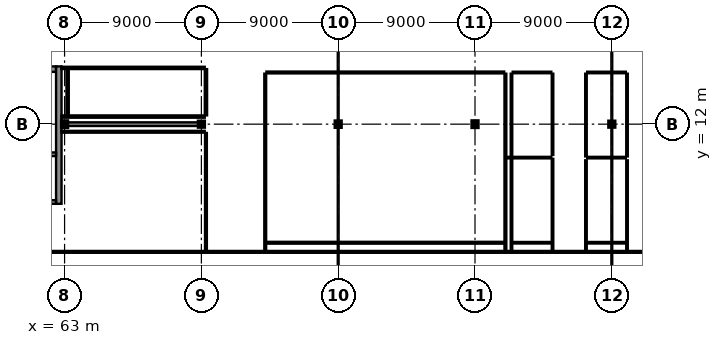
"""IFC4 building model, lengths in metres.
Left out: names, types, materials, properties, quantities, classifications, styles, units other than length and angle.
Written with IfcOpenShell. Run it as: python <this file> out.ifc"""

import sys

from ifc_helpers import new_model, si_unit, direction, frame, frame_2d, origin, origin_2d, place, context, subcontext, project, spatial, rectangle, i_section, extrude, element, fill, save


model = new_model("IFC4")
c1 = context("Model", 3, precision=1e-05, world=origin(), true_north=direction((0.0, 1.0)))
c2 = subcontext(c1, "Body", "Model", "MODEL_VIEW")
j1 = project(units=[si_unit("LENGTHUNIT", "METRE"), si_unit("PLANEANGLEUNIT", "RADIAN")], contexts=[c1])
p1 = place(None, origin())
s1 = spatial("IfcSite", under=j1, at=p1, CompositionType="ELEMENT")
p2 = place(p1, origin())
s2 = spatial("IfcBuilding", under=s1, at=p2, CompositionType="ELEMENT")
p3 = place(p2, frame((0.0, 0.0, 23.4)))
s3 = spatial("IfcBuildingStorey", under=s2, at=p3, CompositionType="ELEMENT", Elevation=23.4)
p4 = place(p3, frame((63.0, 12.0, 0.0), z_axis=(0.0, 0.0, 1.0), x_axis=(1.0, 0.0, 0.0)))
e1 = element("IfcColumn", 1, at=p4, inside=s3, PredefinedType="COLUMN", context=c2, shape_type="SweptSolid", body=[
    extrude(i_section(OverallWidth=0.3, OverallDepth=0.34, WebThickness=0.012, FlangeThickness=0.021, at=origin_2d()), origin(), (0.0, 0.0, 1.0), 4.0),
])
p5 = place(p3, frame((72.0, 12.0, 0.0), z_axis=(0.0, 0.0, 1.0), x_axis=(0.0, 1.0, 0.0)))
e2 = element("IfcColumn", 2, at=p5, inside=s3, PredefinedType="COLUMN", context=c2, shape_type="SweptSolid", body=[
    extrude(i_section(OverallWidth=0.3, OverallDepth=0.3, WebThickness=0.011, FlangeThickness=0.019, at=origin_2d()), origin(), (0.0, 0.0, 1.0), 4.0),
])
p6 = place(p3, frame((81.0, 12.0, 0.0), z_axis=(0.0, 0.0, 1.0), x_axis=(1.0, 0.0, 0.0)))
e3 = element("IfcColumn", 3, at=p6, inside=s3, PredefinedType="COLUMN", context=c2, shape_type="SweptSolid", body=[
    extrude(i_section(OverallWidth=0.3, OverallDepth=0.32, WebThickness=0.011, FlangeThickness=0.021, at=origin_2d()), origin(), (0.0, 0.0, 1.0), 4.0),
])
p7 = place(p3, frame((90.0, 12.0, 0.0), z_axis=(0.0, 0.0, 1.0), x_axis=(1.0, 0.0, 0.0)))
e4 = element("IfcColumn", 4, at=p7, inside=s3, PredefinedType="COLUMN", context=c2, shape_type="SweptSolid", body=[
    extrude(i_section(OverallWidth=0.3, OverallDepth=0.34, WebThickness=0.012, FlangeThickness=0.021, at=origin_2d()), origin(), (0.0, 0.0, 1.0), 4.0),
])
p8 = place(p3, frame((99.0, 12.0, 0.0), z_axis=(0.0, 0.0, 1.0), x_axis=(1.0, 0.0, 0.0)))
e5 = element("IfcColumn", 5, at=p8, inside=s3, PredefinedType="COLUMN", context=c2, shape_type="SweptSolid", body=[
    extrude(i_section(OverallWidth=0.3, OverallDepth=0.3, WebThickness=0.011, FlangeThickness=0.019, at=origin_2d()), origin(), (0.0, 0.0, 1.0), 4.0),
])
p9 = place(p3, frame((58.54, 15.62, 0.0), z_axis=(0.0, 0.0, 1.0), x_axis=(1.0, 0.0, 0.0)))
e6 = element("IfcWall", 6, at=p9, inside=s3, PredefinedType="SHEAR", context=c2, shape_type="SweptSolid", body=[
    extrude(rectangle(XDim=3.9, YDim=0.36, at=frame_2d((1.95, 0.0))), origin(), (0.0, 0.0, 1.0), 3.66),
])
p10 = place(p9, frame((1.15, 0.0, 0.0)))
e7 = element("IfcOpeningElement", 7, at=p10, cuts=e6, PredefinedType="OPENING", context=c2, shape_type="SweptSolid", body=[
    extrude(rectangle(XDim=1.6, YDim=2.25, at=frame_2d((0.8, 1.125))), frame((0.0, 0.195, 0.0), z_axis=(0.0, -1.0, 0.0), x_axis=(1.0, 0.0, 0.0)), (0.0, 0.0, 1.0), 0.39),
])
p11 = place(p3, frame((62.62, 6.76, 0.0), z_axis=(0.0, 0.0, 1.0), x_axis=(0.0, 1.0, 0.0)))
e8 = element("IfcWall", 8, at=p11, inside=s3, PredefinedType="SHEAR", context=c2, shape_type="SweptSolid", body=[
    extrude(rectangle(XDim=9.04, YDim=0.36, at=frame_2d((4.52, 0.0))), origin(), (0.0, 0.0, 1.0), 3.66),
])
p12 = place(p3, frame((58.54, 10.02, 0.0), z_axis=(0.0, 0.0, 1.0), x_axis=(1.0, 0.0, 0.0)))
e9 = element("IfcWall", 9, at=p12, inside=s3, PredefinedType="SHEAR", context=c2, shape_type="SweptSolid", body=[
    extrude(rectangle(XDim=3.9, YDim=0.24, at=frame_2d((1.95, 0.0))), origin(), (0.0, 0.0, 1.0), 3.81),
])
p13 = place(p12, frame((0.235, 0.0, 0.0)))
e10 = element("IfcOpeningElement", 10, at=p13, cuts=e9, PredefinedType="OPENING", context=c2, shape_type="SweptSolid", body=[
    extrude(rectangle(XDim=1.6, YDim=2.3, at=frame_2d((0.8, 1.15))), frame((0.0, 0.135, 0.0), z_axis=(0.0, -1.0, 0.0), x_axis=(1.0, 0.0, 0.0)), (0.0, 0.0, 1.0), 0.27),
])
p14 = place(p12, frame((2.185, 0.0, 0.0)))
e11 = element("IfcOpeningElement", 11, at=p14, cuts=e9, PredefinedType="OPENING", context=c2, shape_type="SweptSolid", body=[
    extrude(rectangle(XDim=1.6, YDim=2.3, at=frame_2d((0.8, 1.15))), frame((0.0, 0.135, 0.0), z_axis=(0.0, -1.0, 0.0), x_axis=(1.0, 0.0, 0.0)), (0.0, 0.0, 1.0), 0.27),
])
p15 = place(p3, frame((58.54, 6.88, 0.0), z_axis=(0.0, 0.0, 1.0), x_axis=(1.0, 0.0, 0.0)))
e12 = element("IfcWall", 12, at=p15, inside=s3, PredefinedType="SHEAR", context=c2, shape_type="SweptSolid", body=[
    extrude(rectangle(XDim=3.9, YDim=0.24, at=frame_2d((1.95, 0.0))), origin(), (0.0, 0.0, 1.0), 3.81),
])
p16 = place(p3, frame((63.008, 12.0, 0.0), z_axis=(0.0, 0.0, 1.0), x_axis=(1.0, 0.0, 0.0)))
e13 = element("IfcWall", 13, at=p16, inside=s3, PredefinedType="SHEAR", context=c2, shape_type="SweptSolid", body=[
    extrude(rectangle(XDim=8.844, YDim=0.24, at=frame_2d((4.422, 0.0))), origin(), (0.0, 0.0, 1.0), 2.845),
])
p17 = place(p3, frame((53.87, 3.6, 0.0), z_axis=(0.0, 0.0, 1.0), x_axis=(1.0, 0.0, 0.0)))
e14 = element("IfcWall", 14, at=p17, inside=s3, PredefinedType="PARTITIONING", context=c2, shape_type="SweptSolid", body=[
    extrude(rectangle(XDim=63.25, YDim=0.12, at=frame_2d((31.625, 0.0))), origin(), (0.0, 0.0, 1.0), 3.64),
])
p18 = place(p17, frame((19.855, 0.0, 0.0)))
e15 = element("IfcOpeningElement", 15, at=p18, cuts=e14, PredefinedType="OPENING", context=c2, shape_type="SweptSolid", body=[
    extrude(rectangle(XDim=0.95, YDim=2.15, at=frame_2d((0.475, 1.075))), frame((0.0, 0.075, 0.0), z_axis=(0.0, -1.0, 0.0), x_axis=(1.0, 0.0, 0.0)), (0.0, 0.0, 1.0), 0.15),
])
p19 = place(p3, frame((72.3, 11.42, 0.0), z_axis=(0.0, 0.0, 1.0), x_axis=(0.0, -1.0, 0.0)))
e16 = element("IfcWall", 16, at=p19, inside=s3, PredefinedType="PARTITIONING", context=c2, shape_type="SweptSolid", body=[
    extrude(rectangle(XDim=7.765, YDim=0.12, at=frame_2d((3.882, 0.0))), origin(), (0.0, 0.0, 1.0), 3.64),
])
p20 = place(p19, frame((3.433, 0.0, 0.0)))
e17 = element("IfcOpeningElement", 17, at=p20, cuts=e16, PredefinedType="OPENING", context=c2, shape_type="SweptSolid", body=[
    extrude(rectangle(XDim=0.9, YDim=2.1, at=frame_2d((0.45, 1.05))), frame((0.0, 0.075, 0.0), z_axis=(0.0, -1.0, 0.0), x_axis=(1.0, 0.0, 0.0)), (0.0, 0.0, 1.0), 0.15),
])
p21 = place(p3, frame((62.795, 11.5, 0.0), z_axis=(0.0, 0.0, 1.0), x_axis=(1.0, 0.0, 0.0)))
e18 = element("IfcWall", 18, at=p21, inside=s3, PredefinedType="PARTITIONING", context=c2, shape_type="SweptSolid", body=[
    extrude(rectangle(XDim=9.425, YDim=0.12, at=frame_2d((4.712, 0.0))), origin(), (0.0, 0.0, 1.0), 3.64),
])
p22 = place(p3, frame((72.22, 12.5, 0.0), z_axis=(0.0, 0.0, 1.0), x_axis=(-1.0, 0.0, 0.0)))
e19 = element("IfcWall", 19, at=p22, inside=s3, PredefinedType="PARTITIONING", context=c2, shape_type="SweptSolid", body=[
    extrude(rectangle(XDim=9.425, YDim=0.15, at=frame_2d((4.712, 0.0))), origin(), (0.0, 0.0, 1.0), 3.64),
])
p23 = place(p3, frame((63.2, 12.57, 0.0), z_axis=(0.0, 0.0, 1.0), x_axis=(0.0, 1.0, 0.0)))
e20 = element("IfcWall", 20, at=p23, inside=s3, PredefinedType="PARTITIONING", context=c2, shape_type="SweptSolid", body=[
    extrude(rectangle(XDim=3.05, YDim=0.15, at=frame_2d((1.525, 0.0))), origin(), (0.0, 0.0, 1.0), 3.365),
])
p24 = place(p3, frame((62.795, 15.7, 0.0), z_axis=(0.0, 0.0, 1.0), x_axis=(1.0, 0.0, 0.0)))
e21 = element("IfcWall", 21, at=p24, inside=s3, PredefinedType="PARTITIONING", context=c2, shape_type="SweptSolid", body=[
    extrude(rectangle(XDim=9.425, YDim=0.15, at=frame_2d((4.712, 0.0))), origin(), (0.0, 0.0, 1.0), 3.64),
])
p25 = place(p24, frame((4.187, 0.0, 0.0)))
e22 = element("IfcOpeningElement", 22, at=p25, cuts=e21, PredefinedType="OPENING", context=c2, shape_type="SweptSolid", body=[
    extrude(rectangle(XDim=1.05, YDim=2.25, at=frame_2d((0.525, 1.125))), frame((0.0, 0.09, 0.0), z_axis=(0.0, -1.0, 0.0), x_axis=(1.0, 0.0, 0.0)), (0.0, 0.0, 1.0), 0.18),
])
p26 = place(p3, frame((72.3, 15.62, 0.0), z_axis=(0.0, 0.0, 1.0), x_axis=(0.0, -1.0, 0.0)))
e23 = element("IfcWall", 23, at=p26, inside=s3, PredefinedType="PARTITIONING", context=c2, shape_type="SweptSolid", body=[
    extrude(rectangle(XDim=3.04, YDim=0.15, at=frame_2d((1.52, 0.0))), origin(), (0.0, 0.0, 1.0), 3.64),
])
p27 = place(p3, frame((92.0, 15.32, 0.0), z_axis=(0.0, 0.0, 1.0), x_axis=(0.0, -1.0, 0.0)))
e24 = element("IfcWall", 24, at=p27, inside=s3, PredefinedType="PARTITIONING", context=c2, shape_type="SweptSolid", body=[
    extrude(rectangle(XDim=11.665, YDim=0.12, at=frame_2d((5.833, 0.0))), origin(), (0.0, 0.0, 1.0), 3.64),
])
p28 = place(p3, frame((91.945, 4.2, 0.0), z_axis=(0.0, 0.0, 1.0), x_axis=(-1.0, 0.0, 0.0)))
e25 = element("IfcWall", 25, at=p28, inside=s3, PredefinedType="PARTITIONING", context=c2, shape_type="SweptSolid", body=[
    extrude(rectangle(XDim=15.665, YDim=0.12, at=frame_2d((7.833, 0.0))), origin(), (0.0, 0.0, 1.0), 3.64),
])
p29 = place(p3, frame((76.2, 3.655, 0.0), z_axis=(0.0, 0.0, 1.0), x_axis=(0.0, 1.0, 0.0)))
e26 = element("IfcWall", 26, at=p29, inside=s3, PredefinedType="PARTITIONING", context=c2, shape_type="SweptSolid", body=[
    extrude(rectangle(XDim=11.665, YDim=0.12, at=frame_2d((5.833, 0.0))), origin(), (0.0, 0.0, 1.0), 3.64),
])
p30 = place(p3, frame((76.28, 15.4, 0.0), z_axis=(0.0, 0.0, 1.0), x_axis=(1.0, 0.0, 0.0)))
e27 = element("IfcWall", 27, at=p30, inside=s3, PredefinedType="PARTITIONING", context=c2, shape_type="SweptSolid", body=[
    extrude(rectangle(XDim=15.64, YDim=0.12, at=frame_2d((7.82, 0.0))), origin(), (0.0, 0.0, 1.0), 3.64),
])
p31 = place(p30, frame((7.37, 0.0, 0.0)))
e28 = element("IfcOpeningElement", 28, at=p31, cuts=e27, PredefinedType="OPENING", context=c2, shape_type="SweptSolid", body=[
    extrude(rectangle(XDim=0.9, YDim=2.1, at=frame_2d((0.45, 1.05))), frame((0.0, 0.075, 0.0), z_axis=(0.0, -1.0, 0.0), x_axis=(1.0, 0.0, 0.0)), (0.0, 0.0, 1.0), 0.15),
])
p32 = place(p3, frame((92.4, 3.655, 0.0), z_axis=(0.0, 0.0, 1.0), x_axis=(0.0, 1.0, 0.0)))
e29 = element("IfcWall", 29, at=p32, inside=s3, PredefinedType="PARTITIONING", context=c2, shape_type="SweptSolid", body=[
    extrude(rectangle(XDim=6.065, YDim=0.1, at=frame_2d((3.032, 0.0))), origin(), (0.0, 0.0, 1.0), 3.64),
])
p33 = place(p3, frame((92.055, 9.8, 0.0), z_axis=(0.0, 0.0, 1.0), x_axis=(1.0, 0.0, 0.0)))
e30 = element("IfcWall", 30, at=p33, inside=s3, PredefinedType="PARTITIONING", context=c2, shape_type="SweptSolid", body=[
    extrude(rectangle(XDim=2.965, YDim=0.1, at=frame_2d((1.482, 0.0))), origin(), (0.0, 0.0, 1.0), 3.64),
])
p34 = place(p3, frame((95.1, 9.72, 0.0), z_axis=(0.0, 0.0, 1.0), x_axis=(0.0, -1.0, 0.0)))
e31 = element("IfcWall", 31, at=p34, inside=s3, PredefinedType="PARTITIONING", context=c2, shape_type="SweptSolid", body=[
    extrude(rectangle(XDim=6.065, YDim=0.1, at=frame_2d((3.032, 0.0))), origin(), (0.0, 0.0, 1.0), 3.64),
])
p35 = place(p34, frame((2.529, 0.0, 0.0)))
e32 = element("IfcOpeningElement", 32, at=p35, cuts=e31, PredefinedType="OPENING", context=c2, shape_type="SweptSolid", body=[
    extrude(rectangle(XDim=0.9, YDim=2.05, at=frame_2d((0.45, 1.025))), frame((0.0, 0.065, 0.0), z_axis=(0.0, -1.0, 0.0), x_axis=(1.0, 0.0, 0.0)), (0.0, 0.0, 1.0), 0.13),
])
p36 = place(p3, frame((95.055, 4.2, 0.0), z_axis=(0.0, 0.0, 1.0), x_axis=(-1.0, 0.0, 0.0)))
e33 = element("IfcWall", 33, at=p36, inside=s3, PredefinedType="PARTITIONING", context=c2, shape_type="SweptSolid", body=[
    extrude(rectangle(XDim=2.61, YDim=0.1, at=frame_2d((1.305, 0.0))), origin(), (0.0, 0.0, 1.0), 3.64),
])
p37 = place(p3, frame((92.48, 15.4, 0.0), z_axis=(0.0, 0.0, 1.0), x_axis=(1.0, 0.0, 0.0)))
e34 = element("IfcWall", 34, at=p37, inside=s3, PredefinedType="PARTITIONING", context=c2, shape_type="SweptSolid", body=[
    extrude(rectangle(XDim=2.54, YDim=0.1, at=frame_2d((1.27, 0.0))), origin(), (0.0, 0.0, 1.0), 3.64),
])
p38 = place(p3, frame((95.1, 15.32, 0.0), z_axis=(0.0, 0.0, 1.0), x_axis=(0.0, -1.0, 0.0)))
e35 = element("IfcWall", 35, at=p38, inside=s3, PredefinedType="PARTITIONING", context=c2, shape_type="SweptSolid", body=[
    extrude(rectangle(XDim=5.34, YDim=0.1, at=frame_2d((2.67, 0.0))), origin(), (0.0, 0.0, 1.0), 3.64),
])
p39 = place(p38, frame((2.22, 0.0, 0.0)))
e36 = element("IfcOpeningElement", 36, at=p39, cuts=e35, PredefinedType="OPENING", context=c2, shape_type="SweptSolid", body=[
    extrude(rectangle(XDim=0.9, YDim=2.05, at=frame_2d((0.45, 1.025))), frame((0.0, 0.065, 0.0), z_axis=(0.0, -1.0, 0.0), x_axis=(1.0, 0.0, 0.0)), (0.0, 0.0, 1.0), 0.13),
])
p40 = place(p3, frame((92.4, 9.845, 0.0), z_axis=(0.0, 0.0, 1.0), x_axis=(0.0, 1.0, 0.0)))
e37 = element("IfcWall", 37, at=p40, inside=s3, PredefinedType="PARTITIONING", context=c2, shape_type="SweptSolid", body=[
    extrude(rectangle(XDim=5.475, YDim=0.1, at=frame_2d((2.738, 0.0))), origin(), (0.0, 0.0, 1.0), 3.64),
])
p41 = place(p3, frame((100.0, 15.32, 0.0), z_axis=(0.0, 0.0, 1.0), x_axis=(0.0, -1.0, 0.0)))
e38 = element("IfcWall", 38, at=p41, inside=s3, PredefinedType="PARTITIONING", context=c2, shape_type="SweptSolid", body=[
    extrude(rectangle(XDim=5.44, YDim=0.1, at=frame_2d((2.72, 0.0))), origin(), (0.0, 0.0, 1.0), 3.64),
])
p42 = place(p3, frame((99.92, 9.8, 0.0), z_axis=(0.0, 0.0, 1.0), x_axis=(-1.0, 0.0, 0.0)))
e39 = element("IfcWall", 39, at=p42, inside=s3, PredefinedType="PARTITIONING", context=c2, shape_type="SweptSolid", body=[
    extrude(rectangle(XDim=2.54, YDim=0.1, at=frame_2d((1.27, 0.0))), origin(), (0.0, 0.0, 1.0), 3.64),
])
p43 = place(p3, frame((97.3, 9.88, 0.0), z_axis=(0.0, 0.0, 1.0), x_axis=(0.0, 1.0, 0.0)))
e40 = element("IfcWall", 40, at=p43, inside=s3, PredefinedType="PARTITIONING", context=c2, shape_type="SweptSolid", body=[
    extrude(rectangle(XDim=5.44, YDim=0.1, at=frame_2d((2.72, 0.0))), origin(), (0.0, 0.0, 1.0), 3.64),
])
p44 = place(p43, frame((2.22, 0.0, 0.0)))
e41 = element("IfcOpeningElement", 41, at=p44, cuts=e40, PredefinedType="OPENING", context=c2, shape_type="SweptSolid", body=[
    extrude(rectangle(XDim=1.0, YDim=2.1, at=frame_2d((0.5, 1.05))), frame((0.0, 0.065, 0.0), z_axis=(0.0, -1.0, 0.0), x_axis=(1.0, 0.0, 0.0)), (0.0, 0.0, 1.0), 0.13),
])
for number, where, z_axis, x_axis in (
    (42, (97.38, 15.4, 0.0), (0.0, 0.0, 1.0), (1.0, 0.0, 0.0)),
    (43, (99.92, 4.2, 0.0), (0.0, 0.0, 1.0), (-1.0, 0.0, 0.0)),
):
    element("IfcWall", number, at=place(p3, frame(where, z_axis=z_axis, x_axis=x_axis)), inside=s3, PredefinedType="PARTITIONING", context=c2, shape_type="SweptSolid", body=[
        extrude(rectangle(XDim=2.54, YDim=0.1, at=frame_2d((1.27, 0.0))), origin(), (0.0, 0.0, 1.0), 3.64),
    ])
p45 = place(p3, frame((97.3, 3.655, 0.0), z_axis=(0.0, 0.0, 1.0), x_axis=(0.0, 1.0, 0.0)))
e44 = element("IfcWall", 44, at=p45, inside=s3, PredefinedType="PARTITIONING", context=c2, shape_type="SweptSolid", body=[
    extrude(rectangle(XDim=5.965, YDim=0.1, at=frame_2d((2.982, 0.0))), origin(), (0.0, 0.0, 1.0), 3.64),
])
p46 = place(p45, frame((2.586, 0.0, 0.0)))
e45 = element("IfcOpeningElement", 45, at=p46, cuts=e44, PredefinedType="OPENING", context=c2, shape_type="SweptSolid", body=[
    extrude(rectangle(XDim=0.9, YDim=2.05, at=frame_2d((0.45, 1.025))), frame((0.0, 0.065, 0.0), z_axis=(0.0, -1.0, 0.0), x_axis=(1.0, 0.0, 0.0)), (0.0, 0.0, 1.0), 0.13),
])
p47 = place(p3, frame((100.0, 9.62, 0.0), z_axis=(0.0, 0.0, 1.0), x_axis=(0.0, -1.0, 0.0)))
e46 = element("IfcWall", 46, at=p47, inside=s3, PredefinedType="PARTITIONING", context=c2, shape_type="SweptSolid", body=[
    extrude(rectangle(XDim=5.965, YDim=0.1, at=frame_2d((2.982, 0.0))), origin(), (0.0, 0.0, 1.0), 3.64),
])
p48 = place(p14, origin())
e47 = element("IfcDoor", 47, at=p48, inside=s3, OperationType="DOUBLE_DOOR_SLIDING", PredefinedType="DOOR", context=c2, shape_type="SweptSolid", body=[
    extrude(rectangle(XDim=1.6, YDim=2.3, at=frame_2d((0.8, 1.15))), frame((0.0, 0.025, 0.0), z_axis=(0.0, -1.0, 0.0), x_axis=(1.0, 0.0, 0.0)), (0.0, 0.0, 1.0), 0.05),
])
fill(e11, e47)
p49 = place(p18, frame((0.95, 0.0, 0.0), z_axis=(0.0, 0.0, 1.0), x_axis=(-1.0, 0.0, 0.0)))
e48 = element("IfcDoor", 48, at=p49, inside=s3, OperationType="SINGLE_SWING_RIGHT", PredefinedType="DOOR", context=c2, shape_type="SweptSolid", body=[
    extrude(rectangle(XDim=0.95, YDim=2.15, at=frame_2d((0.475, 1.075))), frame((0.0, 0.025, 0.0), z_axis=(0.0, -1.0, 0.0), x_axis=(1.0, 0.0, 0.0)), (0.0, 0.0, 1.0), 0.05),
])
fill(e15, e48)
p50 = place(p20, origin())
e49 = element("IfcDoor", 49, at=p50, inside=s3, OperationType="SINGLE_SWING_LEFT", PredefinedType="DOOR", context=c2, shape_type="SweptSolid", body=[
    extrude(rectangle(XDim=0.9, YDim=2.1, at=frame_2d((0.45, 1.05))), frame((0.0, 0.025, 0.0), z_axis=(0.0, -1.0, 0.0), x_axis=(1.0, 0.0, 0.0)), (0.0, 0.0, 1.0), 0.05),
])
fill(e17, e49)
p51 = place(p25, frame((1.05, 0.0, 0.0), z_axis=(0.0, 0.0, 1.0), x_axis=(-1.0, 0.0, 0.0)))
e50 = element("IfcDoor", 50, at=p51, inside=s3, OperationType="SINGLE_SWING_RIGHT", PredefinedType="DOOR", context=c2, shape_type="SweptSolid", body=[
    extrude(rectangle(XDim=1.05, YDim=2.25, at=frame_2d((0.525, 1.125))), frame((0.0, 0.025, 0.0), z_axis=(0.0, -1.0, 0.0), x_axis=(1.0, 0.0, 0.0)), (0.0, 0.0, 1.0), 0.05),
])
fill(e22, e50)
p52 = place(p31, origin())
e51 = element("IfcDoor", 51, at=p52, inside=s3, OperationType="SINGLE_SWING_RIGHT", PredefinedType="DOOR", context=c2, shape_type="SweptSolid", body=[
    extrude(rectangle(XDim=0.9, YDim=2.1, at=frame_2d((0.45, 1.05))), frame((0.0, 0.025, 0.0), z_axis=(0.0, -1.0, 0.0), x_axis=(1.0, 0.0, 0.0)), (0.0, 0.0, 1.0), 0.05),
])
fill(e28, e51)
p53 = place(p35, frame((0.9, 0.0, 0.0), z_axis=(0.0, 0.0, 1.0), x_axis=(-1.0, 0.0, 0.0)))
e52 = element("IfcDoor", 52, at=p53, inside=s3, OperationType="SINGLE_SWING_LEFT", PredefinedType="DOOR", context=c2, shape_type="SweptSolid", body=[
    extrude(rectangle(XDim=0.9, YDim=2.05, at=frame_2d((0.45, 1.025))), frame((0.0, 0.025, 0.0), z_axis=(0.0, -1.0, 0.0), x_axis=(1.0, 0.0, 0.0)), (0.0, 0.0, 1.0), 0.05),
])
fill(e32, e52)
p54 = place(p39, origin())
e53 = element("IfcDoor", 53, at=p54, inside=s3, OperationType="SINGLE_SWING_RIGHT", PredefinedType="DOOR", context=c2, shape_type="SweptSolid", body=[
    extrude(rectangle(XDim=0.9, YDim=2.05, at=frame_2d((0.45, 1.025))), frame((0.0, 0.025, 0.0), z_axis=(0.0, -1.0, 0.0), x_axis=(1.0, 0.0, 0.0)), (0.0, 0.0, 1.0), 0.05),
])
fill(e36, e53)
p55 = place(p44, frame((1.0, 0.0, 0.0), z_axis=(0.0, 0.0, 1.0), x_axis=(-1.0, 0.0, 0.0)))
e54 = element("IfcDoor", 54, at=p55, inside=s3, OperationType="SINGLE_SWING_LEFT", PredefinedType="DOOR", context=c2, shape_type="SweptSolid", body=[
    extrude(rectangle(XDim=1.0, YDim=2.1, at=frame_2d((0.5, 1.05))), frame((0.0, 0.025, 0.0), z_axis=(0.0, -1.0, 0.0), x_axis=(1.0, 0.0, 0.0)), (0.0, 0.0, 1.0), 0.05),
])
fill(e41, e54)
p56 = place(p46, origin())
e55 = element("IfcDoor", 55, at=p56, inside=s3, OperationType="SINGLE_SWING_RIGHT", PredefinedType="DOOR", context=c2, shape_type="SweptSolid", body=[
    extrude(rectangle(XDim=0.9, YDim=2.05, at=frame_2d((0.45, 1.025))), frame((0.0, 0.025, 0.0), z_axis=(0.0, -1.0, 0.0), x_axis=(1.0, 0.0, 0.0)), (0.0, 0.0, 1.0), 0.05),
])
fill(e45, e55)
save(model, sys.argv[1])
